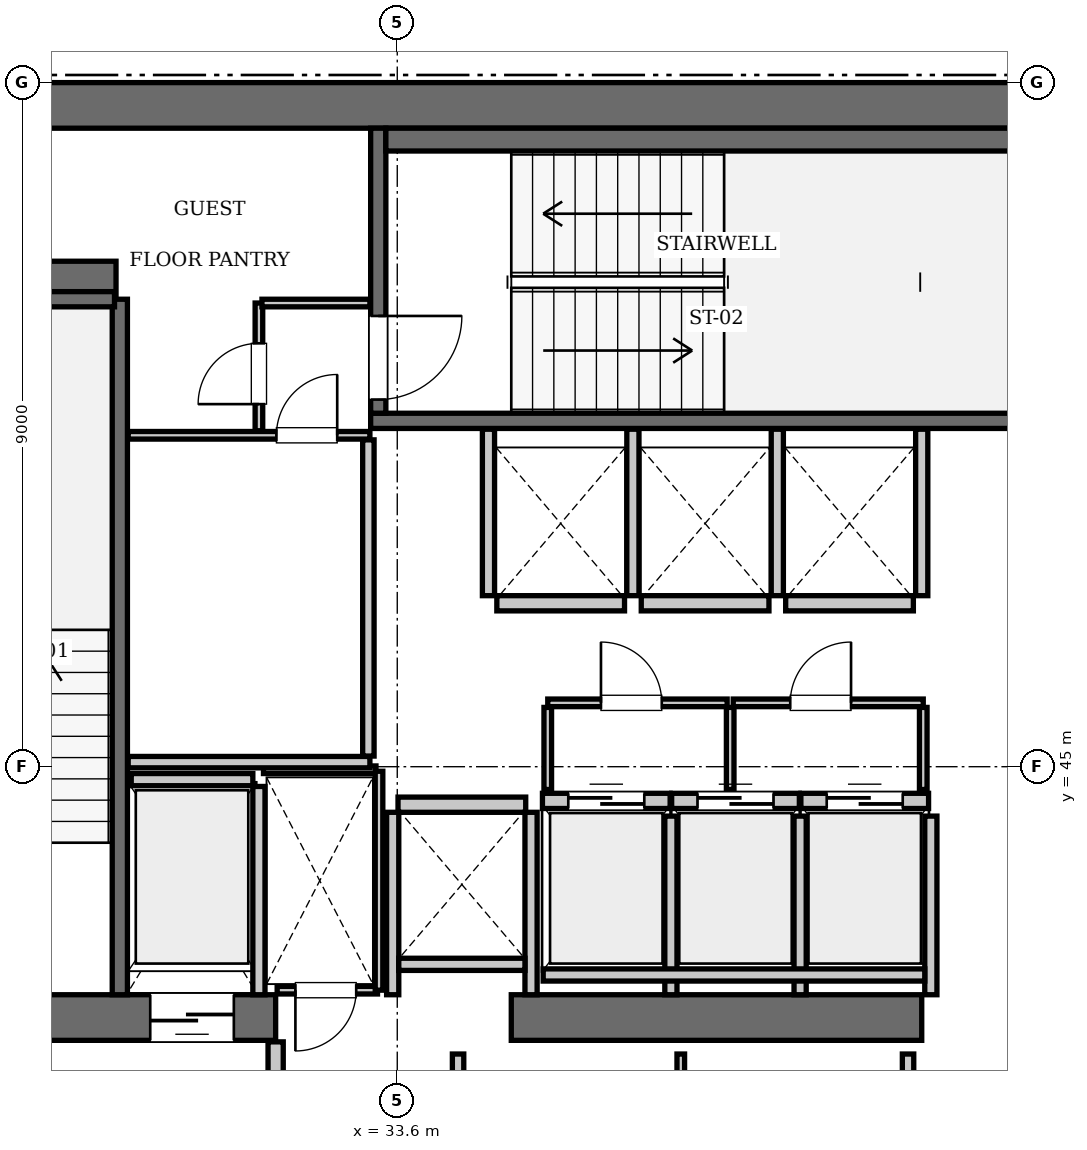
"""IFC4 building model, lengths in metres.
Left out: names, types, materials, properties, quantities, classifications, styles, units other than length and angle.
Written with IfcOpenShell. Run it as: python <this file> out.ifc"""

import sys

from ifc_helpers import new_model, si_unit, direction, frame, frame_2d, origin, place, context, subcontext, project, spatial, rectangle, extrude, element, fill, save


model = new_model("IFC4")
c1 = context("Model", 3, precision=1e-05, world=origin(), true_north=direction((0.0, 1.0)))
c2 = subcontext(c1, "Body", "Model", "MODEL_VIEW")
j1 = project(units=[si_unit("LENGTHUNIT", "METRE"), si_unit("PLANEANGLEUNIT", "RADIAN")], contexts=[c1])
p1 = place(None, origin())
s1 = spatial("IfcSite", under=j1, at=p1, CompositionType="ELEMENT")
p2 = place(p1, origin())
s2 = spatial("IfcBuilding", under=s1, at=p2, CompositionType="ELEMENT")
p3 = place(p2, frame((0.0, 0.0, 312.55)))
s3 = spatial("IfcBuildingStorey", under=s2, at=p3, CompositionType="ELEMENT", Elevation=312.55)
p4 = place(p3, frame((25.2, 53.7, 0.0), z_axis=(0.0, 0.0, 1.0), x_axis=(1.0, 0.0, 0.0)))
e1 = element("IfcWall", 1, at=p4, inside=s3, PredefinedType="SHEAR", context=c2, shape_type="SweptSolid", body=[
    extrude(rectangle(XDim=25.2, YDim=0.6, at=frame_2d((12.6, 0.0))), origin(), (0.0, 0.0, 1.0), 3.85),
])
p5 = place(p3, frame((25.2, 41.7, 0.0), z_axis=(0.0, 0.0, 1.0), x_axis=(1.0, 0.0, 0.0)))
e2 = element("IfcWall", 2, at=p5, inside=s3, PredefinedType="SHEAR", context=c2, shape_type="SweptSolid", body=[
    extrude(rectangle(XDim=6.8, YDim=0.6, at=frame_2d((3.4, 0.0))), origin(), (0.0, 0.0, 1.0), 3.85),
])
p6 = place(p5, frame((1.65, 0.0, 0.0)))
e3 = element("IfcOpeningElement", 3, at=p6, cuts=e2, PredefinedType="OPENING", context=c2, shape_type="SweptSolid", body=[
    extrude(rectangle(XDim=1.15, YDim=2.15, at=frame_2d((0.575, 1.075))), frame((0.0, 0.31, 0.0), z_axis=(0.0, -1.0, 0.0), x_axis=(1.0, 0.0, 0.0)), (0.0, 0.0, 1.0), 0.62),
])
p7 = place(p5, frame((5.15, 0.0, 0.0)))
e4 = element("IfcOpeningElement", 4, at=p7, cuts=e2, PredefinedType="OPENING", context=c2, shape_type="SweptSolid", body=[
    extrude(rectangle(XDim=1.1, YDim=2.2, at=frame_2d((0.55, 1.1))), frame((0.0, 0.31, 0.0), z_axis=(0.0, -1.0, 0.0), x_axis=(1.0, 0.0, 0.0)), (0.0, 0.0, 1.0), 0.62),
])
p8 = place(p3, frame((35.1, 41.7, 0.0), z_axis=(0.0, 0.0, 1.0), x_axis=(1.0, 0.0, 0.0)))
e5 = element("IfcWall", 5, at=p8, inside=s3, PredefinedType="SHEAR", context=c2, shape_type="SweptSolid", body=[
    extrude(rectangle(XDim=5.4, YDim=0.6, at=frame_2d((2.7, 0.0))), origin(), (0.0, 0.0, 1.0), 3.85),
])
p9 = place(p3, frame((25.8, 51.4, 0.0), z_axis=(0.0, 0.0, 1.0), x_axis=(1.0, 0.0, 0.0)))
e6 = element("IfcWall", 6, at=p9, inside=s3, PredefinedType="SHEAR", context=c2, shape_type="SweptSolid", body=[
    extrude(rectangle(XDim=4.1, YDim=0.5, at=frame_2d((2.05, 0.0))), origin(), (0.0, 0.0, 1.0), 3.85),
])
p10 = place(p3, frame((29.95, 42.0, 0.0), z_axis=(0.0, 0.0, 1.0), x_axis=(0.0, 1.0, 0.0)))
e7 = element("IfcWall", 7, at=p10, inside=s3, PredefinedType="SOLIDWALL", context=c2, shape_type="SweptSolid", body=[
    extrude(rectangle(XDim=9.15, YDim=0.2, at=frame_2d((4.575, 0.0))), origin(), (0.0, 0.0, 1.0), 3.55),
])
p11 = place(p3, frame((26.38, 51.15, 0.0), z_axis=(0.0, 0.0, 1.0), x_axis=(1.0, 0.0, 0.0)))
e8 = element("IfcWall", 8, at=p11, inside=s3, PredefinedType="SOLIDWALL", context=c2, shape_type="SweptSolid", body=[
    extrude(rectangle(XDim=3.5, YDim=0.2, at=frame_2d((1.75, 0.0))), origin(), (0.0, 0.0, 1.0), 3.55),
])
p12 = place(p3, frame((33.25, 49.55, 0.0), z_axis=(0.0, 0.0, 1.0), x_axis=(1.0, 0.0, 0.0)))
e9 = element("IfcWall", 9, at=p12, inside=s3, PredefinedType="SOLIDWALL", context=c2, shape_type="SweptSolid", body=[
    extrude(rectangle(XDim=9.1, YDim=0.2, at=frame_2d((4.55, 0.0))), origin(), (0.0, 0.0, 1.0), 3.55),
])
p13 = place(p3, frame((33.35, 49.65, 0.0), z_axis=(0.0, 0.0, 1.0), x_axis=(0.0, 1.0, 0.0)))
e10 = element("IfcWall", 10, at=p13, inside=s3, PredefinedType="SOLIDWALL", context=c2, shape_type="SweptSolid", body=[
    extrude(rectangle(XDim=3.75, YDim=0.2, at=frame_2d((1.875, 0.0))), origin(), (0.0, 0.0, 1.0), 3.55),
])
p14 = place(p13, frame((0.18, 0.0, 0.0)))
e11 = element("IfcOpeningElement", 11, at=p14, cuts=e10, PredefinedType="OPENING", context=c2, shape_type="SweptSolid", body=[
    extrude(rectangle(XDim=1.1, YDim=2.15, at=frame_2d((0.55, 1.075))), frame((0.0, 0.11, 0.0), z_axis=(0.0, -1.0, 0.0), x_axis=(1.0, 0.0, 0.0)), (0.0, 0.0, 1.0), 0.22),
])
p15 = place(p3, frame((33.45, 53.25, 0.0), z_axis=(0.0, 0.0, 1.0), x_axis=(1.0, 0.0, 0.0)))
e12 = element("IfcWall", 12, at=p15, inside=s3, PredefinedType="SOLIDWALL", context=c2, shape_type="SweptSolid", body=[
    extrude(rectangle(XDim=8.7, YDim=0.3, at=frame_2d((4.35, 0.0))), origin(), (0.0, 0.0, 1.0), 3.55),
])
p16 = place(p3, frame((35.51, 44.55, 0.0), z_axis=(0.0, 0.0, 1.0), x_axis=(1.0, 0.0, 0.0)))
e13 = element("IfcWall", 13, at=p16, inside=s3, PredefinedType="SOLIDWALL", context=c2, shape_type="SweptSolid", body=[
    extrude(rectangle(XDim=1.68, YDim=0.2, at=frame_2d((0.84, 0.0))), origin(), (0.0, 0.0, 1.0), 3.55),
])
p17 = place(p16, frame((0.34, 0.0, 0.0)))
e14 = element("IfcOpeningElement", 14, at=p17, cuts=e13, PredefinedType="OPENING", context=c2, shape_type="SweptSolid", body=[
    extrude(rectangle(XDim=1.0, YDim=2.15, at=frame_2d((0.5, 1.075))), frame((0.0, 0.11, 0.0), z_axis=(0.0, -1.0, 0.0), x_axis=(1.0, 0.0, 0.0)), (0.0, 0.0, 1.0), 0.22),
])
p18 = place(p3, frame((37.21, 44.55, 0.0), z_axis=(0.0, 0.0, 1.0), x_axis=(1.0, 0.0, 0.0)))
e15 = element("IfcWall", 15, at=p18, inside=s3, PredefinedType="SOLIDWALL", context=c2, shape_type="SweptSolid", body=[
    extrude(rectangle(XDim=1.68, YDim=0.2, at=frame_2d((0.84, 0.0))), origin(), (0.0, 0.0, 1.0), 3.55),
])
p19 = place(p18, frame((0.34, 0.0, 0.0)))
e16 = element("IfcOpeningElement", 16, at=p19, cuts=e15, PredefinedType="OPENING", context=c2, shape_type="SweptSolid", body=[
    extrude(rectangle(XDim=1.0, YDim=2.15, at=frame_2d((0.5, 1.075))), frame((0.0, 0.11, 0.0), z_axis=(0.0, -1.0, 0.0), x_axis=(1.0, 0.0, 0.0)), (0.0, 0.0, 1.0), 0.22),
])
p20 = place(p3, frame((38.91, 44.55, 0.0), z_axis=(0.0, 0.0, 1.0), x_axis=(1.0, 0.0, 0.0)))
e17 = element("IfcWall", 17, at=p20, inside=s3, PredefinedType="SOLIDWALL", context=c2, shape_type="SweptSolid", body=[
    extrude(rectangle(XDim=1.68, YDim=0.2, at=frame_2d((0.84, 0.0))), origin(), (0.0, 0.0, 1.0), 3.55),
])
p21 = place(p20, frame((0.34, 0.0, 0.0)))
e18 = element("IfcOpeningElement", 18, at=p21, cuts=e17, PredefinedType="OPENING", context=c2, shape_type="SweptSolid", body=[
    extrude(rectangle(XDim=1.0, YDim=2.15, at=frame_2d((0.5, 1.075))), frame((0.0, 0.11, 0.0), z_axis=(0.0, -1.0, 0.0), x_axis=(1.0, 0.0, 0.0)), (0.0, 0.0, 1.0), 0.22),
])
p22 = place(p3, frame((34.91, 47.15, 0.0), z_axis=(0.0, 0.0, 1.0), x_axis=(1.0, 0.0, 0.0)))
e19 = element("IfcWall", 19, at=p22, inside=s3, PredefinedType="SOLIDWALL", context=c2, shape_type="SweptSolid", body=[
    extrude(rectangle(XDim=1.68, YDim=0.2, at=frame_2d((0.84, 0.0))), origin(), (0.0, 0.0, 1.0), 3.55),
])
for number, where, z_axis, x_axis in (
    (20, (36.81, 47.15, 0.0), (0.0, 0.0, 1.0), (1.0, 0.0, 0.0)),
    (21, (38.71, 47.15, 0.0), (0.0, 0.0, 1.0), (1.0, 0.0, 0.0)),
    (22, (33.61, 44.5, 0.0), (0.0, 0.0, 1.0), (1.0, 0.0, 0.0)),
):
    element("IfcWall", number, at=place(p3, frame(where, z_axis=z_axis, x_axis=x_axis)), inside=s3, PredefinedType="SOLIDWALL", context=c2, shape_type="SweptSolid", body=[
        extrude(rectangle(XDim=1.68, YDim=0.2, at=frame_2d((0.84, 0.0))), origin(), (0.0, 0.0, 1.0), 3.55),
    ])
p23 = place(p3, frame((30.1, 44.83, 0.0), z_axis=(0.0, 0.0, 1.0), x_axis=(1.0, 0.0, 0.0)))
e23 = element("IfcWall", 23, at=p23, inside=s3, PredefinedType="SOLIDWALL", context=c2, shape_type="SweptSolid", body=[
    extrude(rectangle(XDim=1.6, YDim=0.16, at=frame_2d((0.8, 0.0))), origin(), (0.0, 0.0, 1.0), 3.55),
])
p24 = place(p3, frame((31.78, 42.0, 0.0), z_axis=(0.0, 0.0, 1.0), x_axis=(0.0, 1.0, 0.0)))
e24 = element("IfcWall", 24, at=p24, inside=s3, PredefinedType="SOLIDWALL", context=c2, shape_type="SweptSolid", body=[
    extrude(rectangle(XDim=2.74, YDim=0.16, at=frame_2d((1.37, 0.0))), origin(), (0.0, 0.0, 1.0), 3.55),
])
for number, where, z_axis, x_axis in (
    (25, (37.2, 42.0, 0.0), (0.0, 0.0, 1.0), (0.0, 1.0, 0.0)),
    (26, (38.9, 42.0, 0.0), (0.0, 0.0, 1.0), (0.0, 1.0, 0.0)),
    (27, (40.62, 42.0, 0.0), (0.0, 0.0, 1.0), (0.0, 1.0, 0.0)),
):
    element("IfcWall", number, at=place(p3, frame(where, z_axis=z_axis, x_axis=x_axis)), inside=s3, PredefinedType="SOLIDWALL", context=c2, shape_type="SweptSolid", body=[
        extrude(rectangle(XDim=2.35, YDim=0.16, at=frame_2d((1.175, 0.0))), origin(), (0.0, 0.0, 1.0), 3.55),
    ])
p25 = place(p3, frame((35.52, 42.26, 0.0), z_axis=(0.0, 0.0, 1.0), x_axis=(1.0, 0.0, 0.0)))
e28 = element("IfcWall", 28, at=p25, inside=s3, PredefinedType="SOLIDWALL", context=c2, shape_type="SweptSolid", body=[
    extrude(rectangle(XDim=5.02, YDim=0.16, at=frame_2d((2.51, 0.0))), origin(), (0.0, 0.0, 1.0), 3.55),
])
for number, where, z_axis, x_axis in (
    (29, (34.8, 47.25, 0.0), (0.0, 0.0, 1.0), (0.0, 1.0, 0.0)),
    (30, (36.7, 47.25, 0.0), (0.0, 0.0, 1.0), (0.0, 1.0, 0.0)),
    (31, (38.6, 47.25, 0.0), (0.0, 0.0, 1.0), (0.0, 1.0, 0.0)),
    (32, (40.5, 47.25, 0.0), (0.0, 0.0, 1.0), (0.0, 1.0, 0.0)),
):
    element("IfcWall", number, at=place(p3, frame(where, z_axis=z_axis, x_axis=x_axis)), inside=s3, PredefinedType="SOLIDWALL", context=c2, shape_type="SweptSolid", body=[
        extrude(rectangle(XDim=2.19, YDim=0.16, at=frame_2d((1.095, 0.0))), origin(), (0.0, 0.0, 1.0), 3.55),
    ])
for number, where, z_axis, x_axis in (
    (33, (33.54, 42.0, 0.0), (0.0, 0.0, 1.0), (0.0, 1.0, 0.0)),
    (34, (35.36, 42.0, 0.0), (0.0, 0.0, 1.0), (0.0, 1.0, 0.0)),
):
    element("IfcWall", number, at=place(p3, frame(where, z_axis=z_axis, x_axis=x_axis)), inside=s3, PredefinedType="SOLIDWALL", context=c2, shape_type="SweptSolid", body=[
        extrude(rectangle(XDim=2.4, YDim=0.16, at=frame_2d((1.2, 0.0))), origin(), (0.0, 0.0, 1.0), 3.55),
    ])
p26 = place(p3, frame((33.62, 42.4, 0.0), z_axis=(0.0, 0.0, 1.0), x_axis=(1.0, 0.0, 0.0)))
e35 = element("IfcWall", 35, at=p26, inside=s3, PredefinedType="SOLIDWALL", context=c2, shape_type="SweptSolid", body=[
    extrude(rectangle(XDim=1.66, YDim=0.16, at=frame_2d((0.83, 0.0))), origin(), (0.0, 0.0, 1.0), 3.55),
])
p27 = place(p3, frame((32.0, 38.31, 0.0), z_axis=(0.0, 0.0, 1.0), x_axis=(0.0, 1.0, 0.0)))
e36 = element("IfcWall", 36, at=p27, inside=s3, PredefinedType="PARTITIONING", context=c2, shape_type="SweptSolid", body=[
    extrude(rectangle(XDim=3.07, YDim=0.2, at=frame_2d((1.535, 0.0))), origin(), (0.0, 0.0, 1.0), 3.55),
])
p28 = place(p3, frame((32.02, 42.06, 0.0), z_axis=(0.0, 0.0, 1.0), x_axis=(1.0, 0.0, 0.0)))
e37 = element("IfcWall", 37, at=p28, inside=s3, PredefinedType="PARTITIONING", context=c2, shape_type="SweptSolid", body=[
    extrude(rectangle(XDim=1.32, YDim=0.1, at=frame_2d((0.66, 0.0))), origin(), (0.0, 0.0, 1.0), 3.55),
])
p29 = place(p28, frame((0.24, 0.0, 0.0)))
e38 = element("IfcOpeningElement", 38, at=p29, cuts=e37, PredefinedType="OPENING", context=c2, shape_type="SweptSolid", body=[
    extrude(rectangle(XDim=0.8, YDim=2.05, at=frame_2d((0.4, 1.025))), frame((0.0, 0.06, 0.0), z_axis=(0.0, -1.0, 0.0), x_axis=(1.0, 0.0, 0.0)), (0.0, 0.0, 1.0), 0.12),
])
p30 = place(p3, frame((31.84, 44.96, 0.0), z_axis=(0.0, 0.0, 1.0), x_axis=(1.0, 0.0, 0.0)))
e39 = element("IfcWall", 39, at=p30, inside=s3, PredefinedType="PARTITIONING", context=c2, shape_type="SweptSolid", body=[
    extrude(rectangle(XDim=1.48, YDim=0.1, at=frame_2d((0.74, 0.0))), origin(), (0.0, 0.0, 1.0), 3.55),
])
p31 = place(p3, frame((33.36, 42.06, 0.0), z_axis=(0.0, 0.0, 1.0), x_axis=(0.0, 1.0, 0.0)))
e40 = element("IfcWall", 40, at=p31, inside=s3, PredefinedType="PARTITIONING", context=c2, shape_type="SweptSolid", body=[
    extrude(rectangle(XDim=2.88, YDim=0.1, at=frame_2d((1.44, 0.0))), origin(), (0.0, 0.0, 1.0), 3.55),
])
p32 = place(p3, frame((35.58, 45.84, 0.0), z_axis=(0.0, 0.0, 1.0), x_axis=(1.0, 0.0, 0.0)))
e41 = element("IfcWall", 41, at=p32, inside=s3, PredefinedType="PARTITIONING", context=c2, shape_type="SweptSolid", body=[
    extrude(rectangle(XDim=2.36, YDim=0.1, at=frame_2d((1.18, 0.0))), origin(), (0.0, 0.0, 1.0), 3.55),
])
p33 = place(p32, frame((0.7, 0.0, 0.0)))
e42 = element("IfcOpeningElement", 42, at=p33, cuts=e41, PredefinedType="OPENING", context=c2, shape_type="SweptSolid", body=[
    extrude(rectangle(XDim=0.8, YDim=2.05, at=frame_2d((0.4, 1.025))), frame((0.0, 0.06, 0.0), z_axis=(0.0, -1.0, 0.0), x_axis=(1.0, 0.0, 0.0)), (0.0, 0.0, 1.0), 0.12),
])
p34 = place(p3, frame((38.02, 45.84, 0.0), z_axis=(0.0, 0.0, 1.0), x_axis=(1.0, 0.0, 0.0)))
e43 = element("IfcWall", 43, at=p34, inside=s3, PredefinedType="PARTITIONING", context=c2, shape_type="SweptSolid", body=[
    extrude(rectangle(XDim=2.5, YDim=0.1, at=frame_2d((1.25, 0.0))), origin(), (0.0, 0.0, 1.0), 3.55),
])
p35 = place(p34, frame((0.75, 0.0, 0.0)))
e44 = element("IfcOpeningElement", 44, at=p35, cuts=e43, PredefinedType="OPENING", context=c2, shape_type="SweptSolid", body=[
    extrude(rectangle(XDim=0.8, YDim=2.05, at=frame_2d((0.4, 1.025))), frame((0.0, 0.06, 0.0), z_axis=(0.0, -1.0, 0.0), x_axis=(1.0, 0.0, 0.0)), (0.0, 0.0, 1.0), 0.12),
])
for number, where, z_axis, x_axis in (
    (45, (35.58, 44.7, 0.0), (0.0, 0.0, 1.0), (0.0, 1.0, 0.0)),
    (46, (37.98, 44.7, 0.0), (0.0, 0.0, 1.0), (0.0, 1.0, 0.0)),
    (47, (40.52, 44.7, 0.0), (0.0, 0.0, 1.0), (0.0, 1.0, 0.0)),
):
    element("IfcWall", number, at=place(p3, frame(where, z_axis=z_axis, x_axis=x_axis)), inside=s3, PredefinedType="PARTITIONING", context=c2, shape_type="SweptSolid", body=[
        extrude(rectangle(XDim=1.08, YDim=0.1, at=frame_2d((0.54, 0.0))), origin(), (0.0, 0.0, 1.0), 3.55),
    ])
p36 = place(p3, frame((30.06, 45.06, 0.0), z_axis=(0.0, 0.0, 1.0), x_axis=(1.0, 0.0, 0.0)))
e48 = element("IfcWall", 48, at=p36, inside=s3, PredefinedType="PARTITIONING", context=c2, shape_type="SweptSolid", body=[
    extrude(rectangle(XDim=3.18, YDim=0.15, at=frame_2d((1.59, 0.0))), origin(), (0.0, 0.0, 1.0), 3.55),
])
p37 = place(p3, frame((33.22, 45.14, 0.0), z_axis=(0.0, 0.0, 1.0), x_axis=(0.0, 1.0, 0.0)))
e49 = element("IfcWall", 49, at=p37, inside=s3, PredefinedType="PARTITIONING", context=c2, shape_type="SweptSolid", body=[
    extrude(rectangle(XDim=4.16, YDim=0.15, at=frame_2d((2.08, 0.0))), origin(), (0.0, 0.0, 1.0), 3.55),
])
p38 = place(p3, frame((30.06, 49.36, 0.0), z_axis=(0.0, 0.0, 1.0), x_axis=(1.0, 0.0, 0.0)))
e50 = element("IfcWall", 50, at=p38, inside=s3, PredefinedType="PARTITIONING", context=c2, shape_type="SweptSolid", body=[
    extrude(rectangle(XDim=3.18, YDim=0.1, at=frame_2d((1.59, 0.0))), origin(), (0.0, 0.0, 1.0), 3.55),
])
p39 = place(p38, frame((1.95, 0.0, 0.0)))
e51 = element("IfcOpeningElement", 51, at=p39, cuts=e50, PredefinedType="OPENING", context=c2, shape_type="SweptSolid", body=[
    extrude(rectangle(XDim=0.8, YDim=2.05, at=frame_2d((0.4, 1.025))), frame((0.0, 0.06, 0.0), z_axis=(0.0, -1.0, 0.0), x_axis=(1.0, 0.0, 0.0)), (0.0, 0.0, 1.0), 0.12),
])
p40 = place(p3, frame((31.78, 49.42, 0.0), z_axis=(0.0, 0.0, 1.0), x_axis=(0.0, 1.0, 0.0)))
e52 = element("IfcWall", 52, at=p40, inside=s3, PredefinedType="PARTITIONING", context=c2, shape_type="SweptSolid", body=[
    extrude(rectangle(XDim=1.68, YDim=0.1, at=frame_2d((0.84, 0.0))), origin(), (0.0, 0.0, 1.0), 3.55),
])
p41 = place(p40, frame((0.35, 0.0, 0.0)))
e53 = element("IfcOpeningElement", 53, at=p41, cuts=e52, PredefinedType="OPENING", context=c2, shape_type="SweptSolid", body=[
    extrude(rectangle(XDim=0.8, YDim=2.05, at=frame_2d((0.4, 1.025))), frame((0.0, 0.06, 0.0), z_axis=(0.0, -1.0, 0.0), x_axis=(1.0, 0.0, 0.0)), (0.0, 0.0, 1.0), 0.12),
])
p42 = place(p3, frame((31.82, 51.1, 0.0), z_axis=(0.0, 0.0, 1.0), x_axis=(1.0, 0.0, 0.0)))
e54 = element("IfcWall", 54, at=p42, inside=s3, PredefinedType="PARTITIONING", context=c2, shape_type="SweptSolid", body=[
    extrude(rectangle(XDim=1.42, YDim=0.1, at=frame_2d((0.71, 0.0))), origin(), (0.0, 0.0, 1.0), 3.55),
])
p43 = place(p3, frame((34.4, 38.38, 0.0), z_axis=(0.0, 0.0, 1.0), x_axis=(0.0, 1.0, 0.0)))
e55 = element("IfcWall", 55, at=p43, inside=s3, PredefinedType="PARTITIONING", context=c2, shape_type="SweptSolid", body=[
    extrude(rectangle(XDim=2.84, YDim=0.15, at=frame_2d((1.42, 0.0))), origin(), (0.0, 0.0, 1.0), 3.55),
])
p44 = place(p3, frame((37.33, 38.38, 0.0), z_axis=(0.0, 0.0, 1.0), x_axis=(0.0, 1.0, 0.0)))
e56 = element("IfcWall", 56, at=p44, inside=s3, PredefinedType="PARTITIONING", context=c2, shape_type="SweptSolid", body=[
    extrude(rectangle(XDim=2.84, YDim=0.1, at=frame_2d((1.42, 0.0))), origin(), (0.0, 0.0, 1.0), 3.55),
])
p45 = place(p3, frame((40.32, 38.38, 0.0), z_axis=(0.0, 0.0, 1.0), x_axis=(0.0, 1.0, 0.0)))
e57 = element("IfcWall", 57, at=p45, inside=s3, PredefinedType="PARTITIONING", context=c2, shape_type="SweptSolid", body=[
    extrude(rectangle(XDim=2.84, YDim=0.15, at=frame_2d((1.42, 0.0))), origin(), (0.0, 0.0, 1.0), 3.55),
])
p46 = place(p14, frame((1.1, 0.0, 0.0), z_axis=(0.0, 0.0, 1.0), x_axis=(-1.0, 0.0, 0.0)))
e58 = element("IfcDoor", 58, at=p46, inside=s3, OperationType="SINGLE_SWING_LEFT", PredefinedType="DOOR", context=c2, shape_type="SweptSolid", body=[
    extrude(rectangle(XDim=1.1, YDim=2.15, at=frame_2d((0.55, 1.075))), frame((0.0, 0.025, 0.0), z_axis=(0.0, -1.0, 0.0), x_axis=(1.0, 0.0, 0.0)), (0.0, 0.0, 1.0), 0.05),
])
fill(e11, e58)
p47 = place(p17, origin())
e59 = element("IfcDoor", 59, at=p47, inside=s3, OperationType="SLIDING_TO_LEFT", PredefinedType="DOOR", context=c2, shape_type="SweptSolid", body=[
    extrude(rectangle(XDim=1.0, YDim=2.15, at=frame_2d((0.5, 1.075))), frame((0.0, 0.025, 0.0), z_axis=(0.0, -1.0, 0.0), x_axis=(1.0, 0.0, 0.0)), (0.0, 0.0, 1.0), 0.05),
])
fill(e14, e59)
p48 = place(p19, origin())
e60 = element("IfcDoor", 60, at=p48, inside=s3, OperationType="SLIDING_TO_LEFT", PredefinedType="DOOR", context=c2, shape_type="SweptSolid", body=[
    extrude(rectangle(XDim=1.0, YDim=2.15, at=frame_2d((0.5, 1.075))), frame((0.0, 0.025, 0.0), z_axis=(0.0, -1.0, 0.0), x_axis=(1.0, 0.0, 0.0)), (0.0, 0.0, 1.0), 0.05),
])
fill(e16, e60)
p49 = place(p21, origin())
e61 = element("IfcDoor", 61, at=p49, inside=s3, OperationType="SLIDING_TO_LEFT", PredefinedType="DOOR", context=c2, shape_type="SweptSolid", body=[
    extrude(rectangle(XDim=1.0, YDim=2.15, at=frame_2d((0.5, 1.075))), frame((0.0, 0.025, 0.0), z_axis=(0.0, -1.0, 0.0), x_axis=(1.0, 0.0, 0.0)), (0.0, 0.0, 1.0), 0.05),
])
fill(e18, e61)
p50 = place(p7, frame((1.1, 0.0, 0.0), z_axis=(0.0, 0.0, 1.0), x_axis=(-1.0, 0.0, 0.0)))
e62 = element("IfcDoor", 62, at=p50, inside=s3, OperationType="SLIDING_TO_LEFT", PredefinedType="DOOR", context=c2, shape_type="SweptSolid", body=[
    extrude(rectangle(XDim=1.1, YDim=2.2, at=frame_2d((0.55, 1.1))), frame((0.0, 0.025, 0.0), z_axis=(0.0, -1.0, 0.0), x_axis=(1.0, 0.0, 0.0)), (0.0, 0.0, 1.0), 0.05),
])
fill(e4, e62)
p51 = place(p29, frame((0.8, 0.0, 0.0), z_axis=(0.0, 0.0, 1.0), x_axis=(-1.0, 0.0, 0.0)))
e63 = element("IfcDoor", 63, at=p51, inside=s3, OperationType="SINGLE_SWING_RIGHT", PredefinedType="DOOR", context=c2, shape_type="SweptSolid", body=[
    extrude(rectangle(XDim=0.8, YDim=2.05, at=frame_2d((0.4, 1.025))), frame((0.0, 0.025, 0.0), z_axis=(0.0, -1.0, 0.0), x_axis=(1.0, 0.0, 0.0)), (0.0, 0.0, 1.0), 0.05),
])
fill(e38, e63)
p52 = place(p33, origin())
e64 = element("IfcDoor", 64, at=p52, inside=s3, OperationType="SINGLE_SWING_LEFT", PredefinedType="DOOR", context=c2, shape_type="SweptSolid", body=[
    extrude(rectangle(XDim=0.8, YDim=2.05, at=frame_2d((0.4, 1.025))), frame((0.0, 0.025, 0.0), z_axis=(0.0, -1.0, 0.0), x_axis=(1.0, 0.0, 0.0)), (0.0, 0.0, 1.0), 0.05),
])
fill(e42, e64)
p53 = place(p35, origin())
e65 = element("IfcDoor", 65, at=p53, inside=s3, OperationType="SINGLE_SWING_RIGHT", PredefinedType="DOOR", context=c2, shape_type="SweptSolid", body=[
    extrude(rectangle(XDim=0.8, YDim=2.05, at=frame_2d((0.4, 1.025))), frame((0.0, 0.025, 0.0), z_axis=(0.0, -1.0, 0.0), x_axis=(1.0, 0.0, 0.0)), (0.0, 0.0, 1.0), 0.05),
])
fill(e44, e65)
p54 = place(p39, origin())
e66 = element("IfcDoor", 66, at=p54, inside=s3, OperationType="SINGLE_SWING_RIGHT", PredefinedType="DOOR", context=c2, shape_type="SweptSolid", body=[
    extrude(rectangle(XDim=0.8, YDim=2.05, at=frame_2d((0.4, 1.025))), frame((0.0, 0.025, 0.0), z_axis=(0.0, -1.0, 0.0), x_axis=(1.0, 0.0, 0.0)), (0.0, 0.0, 1.0), 0.05),
])
fill(e51, e66)
p55 = place(p41, origin())
e67 = element("IfcDoor", 67, at=p55, inside=s3, OperationType="SINGLE_SWING_LEFT", PredefinedType="DOOR", context=c2, shape_type="SweptSolid", body=[
    extrude(rectangle(XDim=0.8, YDim=2.05, at=frame_2d((0.4, 1.025))), frame((0.0, 0.025, 0.0), z_axis=(0.0, -1.0, 0.0), x_axis=(1.0, 0.0, 0.0)), (0.0, 0.0, 1.0), 0.05),
])
fill(e53, e67)
save(model, sys.argv[1])
